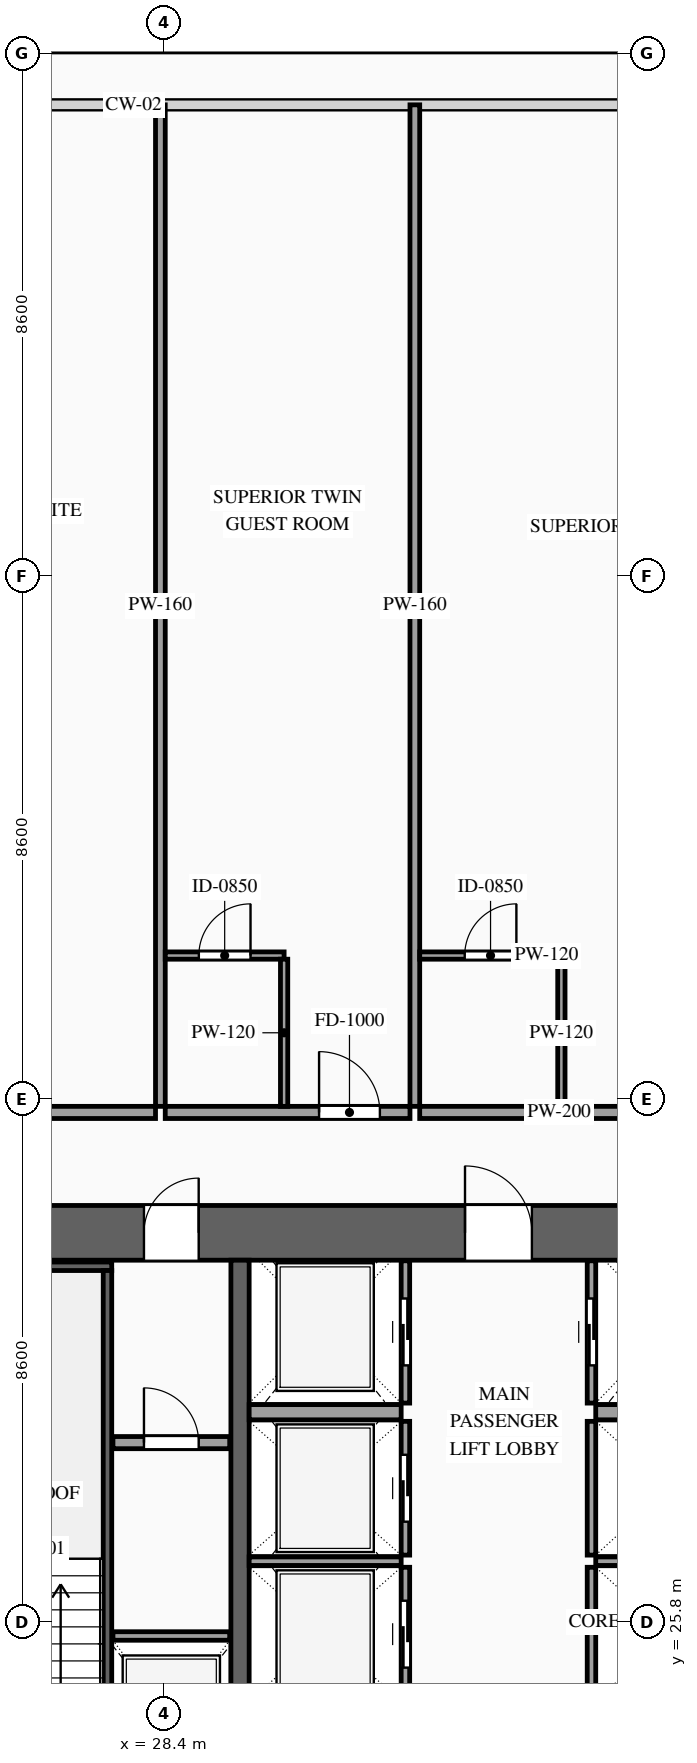
"""IFC4 building model, lengths in metres.
Left out: names, types, materials, properties, quantities, classifications, styles, units other than length and angle.
Written with IfcOpenShell. Run it as: python <this file> out.ifc"""

import sys

from ifc_helpers import new_model, si_unit, direction, frame, frame_2d, origin, place, context, subcontext, project, spatial, rectangle, extrude, source, transform, mapped, element, fill, save


model = new_model("IFC4")
c1 = context("Model", 3, precision=1e-05, world=origin(), true_north=direction((0.0, 1.0)))
c2 = subcontext(c1, "Body", "Model", "MODEL_VIEW")
j1 = project(units=[si_unit("LENGTHUNIT", "METRE"), si_unit("PLANEANGLEUNIT", "RADIAN")], contexts=[c1])
p1 = place(None, origin())
s1 = spatial("IfcSite", under=j1, at=p1, CompositionType="ELEMENT")
p2 = place(p1, origin())
s2 = spatial("IfcBuilding", under=s1, at=p2, CompositionType="ELEMENT")
p3 = place(p2, frame((0.0, 0.0, 49.6)))
s3 = spatial("IfcBuildingStorey", under=s2, at=p3, CompositionType="ELEMENT", Elevation=49.6)
p4 = place(p3, frame((23.35, 32.2, 0.0), z_axis=(0.0, 0.0, 1.0), x_axis=(1.0, 0.0, 0.0)))
e1 = element("IfcWall", 1, at=p4, inside=s3, PredefinedType="SHEAR", context=c2, shape_type="SweptSolid", body=[
    extrude(rectangle(XDim=27.3, YDim=0.9, at=frame_2d((13.65, 0.0))), origin(), (0.0, 0.0, 1.0), 3.6),
])
p5 = place(p4, frame((4.72, 0.0, 0.0)))
e2 = element("IfcOpeningElement", 2, at=p5, cuts=e1, PredefinedType="OPENING", context=c2, shape_type="SweptSolid", body=[
    extrude(rectangle(XDim=0.9, YDim=2.15, at=frame_2d((0.45, 1.075))), frame((0.0, 0.465, 0.0), z_axis=(0.0, -1.0, 0.0), x_axis=(1.0, 0.0, 0.0)), (0.0, 0.0, 1.0), 0.93),
])
p6 = place(p4, frame((10.0, 0.0, 0.0)))
e3 = element("IfcOpeningElement", 3, at=p6, cuts=e1, PredefinedType="OPENING", context=c2, shape_type="SweptSolid", body=[
    extrude(rectangle(XDim=1.1, YDim=2.2, at=frame_2d((0.55, 1.1))), frame((0.0, 0.465, 0.0), z_axis=(0.0, -1.0, 0.0), x_axis=(1.0, 0.0, 0.0)), (0.0, 0.0, 1.0), 0.93),
])
p7 = place(p4, frame((15.85, 0.0, 0.0)))
e4 = element("IfcOpeningElement", 4, at=p7, cuts=e1, PredefinedType="OPENING", context=c2, shape_type="SweptSolid", body=[
    extrude(rectangle(XDim=1.1, YDim=2.2, at=frame_2d((0.55, 1.1))), frame((0.0, 0.465, 0.0), z_axis=(0.0, -1.0, 0.0), x_axis=(1.0, 0.0, 0.0)), (0.0, 0.0, 1.0), 0.93),
])
p8 = place(p4, frame((19.05, 0.0, 0.0)))
e5 = element("IfcOpeningElement", 5, at=p8, cuts=e1, PredefinedType="OPENING", context=c2, shape_type="SweptSolid", body=[
    extrude(rectangle(XDim=0.9, YDim=2.15, at=frame_2d((0.45, 1.075))), frame((0.0, 0.465, 0.0), z_axis=(0.0, -1.0, 0.0), x_axis=(1.0, 0.0, 0.0)), (0.0, 0.0, 1.0), 0.93),
])
m1 = source(origin(), c2, "Body", "SweptSolid", [
    extrude(rectangle(XDim=11.9, YDim=0.3, at=frame_2d((5.95, 0.0))), origin(), (0.0, 0.0, 1.0), 3.6),
])
p9 = place(p3, frame((29.65, 19.85, 0.0), z_axis=(0.0, 0.0, 1.0), x_axis=(0.0, 1.0, 0.0)))
e6 = element("IfcWall", 6, at=p9, inside=s3, PredefinedType="SOLIDWALL", context=c2, shape_type="MappedRepresentation", body=[
    mapped(m1, transform((0.0, 0.0, 0.0), scale=1.0)),
])
m2 = source(origin(), c2, "Body", "SweptSolid", [
    extrude(rectangle(XDim=1.92, YDim=0.14, at=frame_2d((0.96, 0.0))), origin(), (0.0, 0.0, 1.0), 3.38),
])
p10 = place(p3, frame((27.56, 25.57, 0.0), z_axis=(0.0, 0.0, 1.0), x_axis=(1.0, 0.0, 0.0)))
e7 = element("IfcWall", 7, at=p10, inside=s3, PredefinedType="SOLIDWALL", context=c2, shape_type="MappedRepresentation", body=[
    mapped(m2, transform((0.0, 0.0, 0.0), scale=1.0)),
])
p11 = place(p3, frame((32.37, 24.5, 0.0), z_axis=(0.0, 0.0, 1.0), x_axis=(0.0, 1.0, 0.0)))
e8 = element("IfcWall", 8, at=p11, inside=s3, PredefinedType="SOLIDWALL", context=c2, shape_type="SweptSolid", body=[
    extrude(rectangle(XDim=2.2, YDim=0.14, at=frame_2d((1.1, 0.0))), origin(), (0.0, 0.0, 1.0), 3.38),
])
p12 = place(p11, frame((0.55, 0.0, 0.0)))
e9 = element("IfcOpeningElement", 9, at=p12, cuts=e8, PredefinedType="OPENING", context=c2, shape_type="SweptSolid", body=[
    extrude(rectangle(XDim=1.1, YDim=2.2, at=frame_2d((0.55, 1.1))), frame((0.0, 0.085, 0.0), z_axis=(0.0, -1.0, 0.0), x_axis=(1.0, 0.0, 0.0)), (0.0, 0.0, 1.0), 0.17),
])
m3 = source(origin(), c2, "Body", "SweptSolid", [
    extrude(rectangle(XDim=2.5, YDim=0.14, at=frame_2d((1.25, 0.0))), origin(), (0.0, 0.0, 1.0), 3.38),
])
p13 = place(p3, frame((29.8, 26.8, 0.0), z_axis=(0.0, 0.0, 1.0), x_axis=(1.0, 0.0, 0.0)))
e10 = element("IfcWall", 10, at=p13, inside=s3, PredefinedType="SOLIDWALL", context=c2, shape_type="MappedRepresentation", body=[
    mapped(m3, transform((0.0, 0.0, 0.0), scale=1.0)),
])
p14 = place(p3, frame((32.37, 26.9, 0.0), z_axis=(0.0, 0.0, 1.0), x_axis=(0.0, 1.0, 0.0)))
e11 = element("IfcWall", 11, at=p14, inside=s3, PredefinedType="SOLIDWALL", context=c2, shape_type="SweptSolid", body=[
    extrude(rectangle(XDim=2.2, YDim=0.14, at=frame_2d((1.1, 0.0))), origin(), (0.0, 0.0, 1.0), 3.38),
])
p15 = place(p14, frame((0.55, 0.0, 0.0)))
e12 = element("IfcOpeningElement", 12, at=p15, cuts=e11, PredefinedType="OPENING", context=c2, shape_type="SweptSolid", body=[
    extrude(rectangle(XDim=1.1, YDim=2.2, at=frame_2d((0.55, 1.1))), frame((0.0, 0.085, 0.0), z_axis=(0.0, -1.0, 0.0), x_axis=(1.0, 0.0, 0.0)), (0.0, 0.0, 1.0), 0.17),
])
p16 = place(p3, frame((32.37, 29.4, 0.0), z_axis=(0.0, 0.0, 1.0), x_axis=(0.0, 1.0, 0.0)))
e13 = element("IfcWall", 13, at=p16, inside=s3, PredefinedType="SOLIDWALL", context=c2, shape_type="SweptSolid", body=[
    extrude(rectangle(XDim=2.34, YDim=0.14, at=frame_2d((1.17, 0.0))), origin(), (0.0, 0.0, 1.0), 3.38),
])
p17 = place(p16, frame((0.62, 0.0, 0.0)))
e14 = element("IfcOpeningElement", 14, at=p17, cuts=e13, PredefinedType="OPENING", context=c2, shape_type="SweptSolid", body=[
    extrude(rectangle(XDim=1.1, YDim=2.2, at=frame_2d((0.55, 1.1))), frame((0.0, 0.085, 0.0), z_axis=(0.0, -1.0, 0.0), x_axis=(1.0, 0.0, 0.0)), (0.0, 0.0, 1.0), 0.17),
])
m4 = source(origin(), c2, "Body", "SweptSolid", [
    extrude(rectangle(XDim=2.5, YDim=0.25, at=frame_2d((1.25, 0.0))), origin(), (0.0, 0.0, 1.0), 3.38),
])
p18 = place(p3, frame((29.8, 29.25, 0.0), z_axis=(0.0, 0.0, 1.0), x_axis=(1.0, 0.0, 0.0)))
e15 = element("IfcWall", 15, at=p18, inside=s3, PredefinedType="SOLIDWALL", context=c2, shape_type="MappedRepresentation", body=[
    mapped(m4, transform((0.0, 0.0, 0.0), scale=1.0)),
])
m5 = source(origin(), c2, "Body", "SweptSolid", [
    extrude(rectangle(XDim=2.2, YDim=0.14, at=frame_2d((1.1, 0.0))), origin(), (0.0, 0.0, 1.0), 3.38),
])
p19 = place(p3, frame((35.43, 24.5, 0.0), z_axis=(0.0, 0.0, 1.0), x_axis=(0.0, 1.0, 0.0)))
e16 = element("IfcWall", 16, at=p19, inside=s3, PredefinedType="SOLIDWALL", context=c2, shape_type="MappedRepresentation", body=[
    mapped(m5, transform((0.0, 0.0, 0.0), scale=1.0)),
])
m6 = source(origin(), c2, "Body", "SweptSolid", [
    extrude(rectangle(XDim=2.4, YDim=0.14, at=frame_2d((1.2, 0.0))), origin(), (0.0, 0.0, 1.0), 3.38),
])
p20 = place(p3, frame((35.5, 26.8, 0.0), z_axis=(0.0, 0.0, 1.0), x_axis=(1.0, 0.0, 0.0)))
e17 = element("IfcWall", 17, at=p20, inside=s3, PredefinedType="SOLIDWALL", context=c2, shape_type="MappedRepresentation", body=[
    mapped(m6, transform((0.0, 0.0, 0.0), scale=1.0)),
])
m7 = source(origin(), c2, "Body", "SweptSolid", [
    extrude(rectangle(XDim=2.2, YDim=0.14, at=frame_2d((1.1, 0.0))), origin(), (0.0, 0.0, 1.0), 3.38),
])
p21 = place(p3, frame((35.43, 26.9, 0.0), z_axis=(0.0, 0.0, 1.0), x_axis=(0.0, 1.0, 0.0)))
e18 = element("IfcWall", 18, at=p21, inside=s3, PredefinedType="SOLIDWALL", context=c2, shape_type="MappedRepresentation", body=[
    mapped(m7, transform((0.0, 0.0, 0.0), scale=1.0)),
])
p22 = place(p3, frame((35.43, 29.4, 0.0), z_axis=(0.0, 0.0, 1.0), x_axis=(0.0, 1.0, 0.0)))
e19 = element("IfcWall", 19, at=p22, inside=s3, PredefinedType="SOLIDWALL", context=c2, shape_type="SweptSolid", body=[
    extrude(rectangle(XDim=2.34, YDim=0.14, at=frame_2d((1.17, 0.0))), origin(), (0.0, 0.0, 1.0), 3.38),
])
p23 = place(p22, frame((0.62, 0.0, 0.0)))
e20 = element("IfcOpeningElement", 20, at=p23, cuts=e19, PredefinedType="OPENING", context=c2, shape_type="SweptSolid", body=[
    extrude(rectangle(XDim=1.1, YDim=2.2, at=frame_2d((0.55, 1.1))), frame((0.0, 0.085, 0.0), z_axis=(0.0, -1.0, 0.0), x_axis=(1.0, 0.0, 0.0)), (0.0, 0.0, 1.0), 0.17),
])
m8 = source(origin(), c2, "Body", "SweptSolid", [
    extrude(rectangle(XDim=2.4, YDim=0.25, at=frame_2d((1.2, 0.0))), origin(), (0.0, 0.0, 1.0), 3.38),
])
p24 = place(p3, frame((35.5, 29.25, 0.0), z_axis=(0.0, 0.0, 1.0), x_axis=(1.0, 0.0, 0.0)))
e21 = element("IfcWall", 21, at=p24, inside=s3, PredefinedType="SOLIDWALL", context=c2, shape_type="MappedRepresentation", body=[
    mapped(m8, transform((0.0, 0.0, 0.0), scale=1.0)),
])
m9 = source(origin(), c2, "Body", "SweptSolid", [
    extrude(rectangle(XDim=3.28, YDim=0.14, at=frame_2d((1.64, 0.0))), origin(), (0.0, 0.0, 1.0), 3.38),
])
p25 = place(p3, frame((24.26, 31.65, 0.0), z_axis=(0.0, 0.0, 1.0), x_axis=(1.0, 0.0, 0.0)))
e22 = element("IfcWall", 22, at=p25, inside=s3, PredefinedType="SOLIDWALL", context=c2, shape_type="MappedRepresentation", body=[
    mapped(m9, transform((0.0, 0.0, 0.0), scale=1.0)),
])
m10 = source(origin(), c2, "Body", "SweptSolid", [
    extrude(rectangle(XDim=8.94, YDim=0.14, at=frame_2d((4.47, 0.0))), origin(), (0.0, 0.0, 1.0), 3.38),
])
p26 = place(p3, frame((27.47, 22.64, 0.0), z_axis=(0.0, 0.0, 1.0), x_axis=(0.0, 1.0, 0.0)))
e23 = element("IfcWall", 23, at=p26, inside=s3, PredefinedType="SOLIDWALL", context=c2, shape_type="MappedRepresentation", body=[
    mapped(m10, transform((0.0, 0.0, 0.0), scale=1.0)),
])
p27 = place(p3, frame((27.56, 28.75, 0.0), z_axis=(0.0, 0.0, 1.0), x_axis=(1.0, 0.0, 0.0)))
e24 = element("IfcWall", 24, at=p27, inside=s3, PredefinedType="PARTITIONING", context=c2, shape_type="SweptSolid", body=[
    extrude(rectangle(XDim=1.92, YDim=0.2, at=frame_2d((0.96, 0.0))), origin(), (0.0, 0.0, 1.0), 3.38),
])
p28 = place(p27, frame((0.51, 0.0, 0.0)))
e25 = element("IfcOpeningElement", 25, at=p28, cuts=e24, PredefinedType="OPENING", context=c2, shape_type="SweptSolid", body=[
    extrude(rectangle(XDim=0.9, YDim=2.15, at=frame_2d((0.45, 1.075))), frame((0.0, 0.115, 0.0), z_axis=(0.0, -1.0, 0.0), x_axis=(1.0, 0.0, 0.0)), (0.0, 0.0, 1.0), 0.23),
])
p29 = place(p3, frame((21.197, 34.18, 0.0), z_axis=(0.0, 0.0, 1.0), x_axis=(1.0, 0.0, 0.0)))
e26 = element("IfcWall", 26, at=p29, inside=s3, PredefinedType="PARTITIONING", context=c2, shape_type="SweptSolid", body=[
    extrude(rectangle(XDim=7.063, YDim=0.2, at=frame_2d((3.531, 0.0))), origin(), (0.0, 0.0, 1.0), 3.38),
])
p30 = place(p29, frame((4.237, 0.0, 0.0)))
e27 = element("IfcOpeningElement", 27, at=p30, cuts=e26, PredefinedType="OPENING", context=c2, shape_type="SweptSolid", body=[
    extrude(rectangle(XDim=1.0, YDim=2.2, at=frame_2d((0.5, 1.1))), frame((0.0, 0.115, 0.0), z_axis=(0.0, -1.0, 0.0), x_axis=(1.0, 0.0, 0.0)), (0.0, 0.0, 1.0), 0.23),
])
m11 = source(origin(), c2, "Body", "SweptSolid", [
    extrude(rectangle(XDim=16.47, YDim=0.16, at=frame_2d((8.235, 0.0))), origin(), (0.0, 0.0, 1.0), 3.38),
])
p31 = place(p3, frame((28.34, 34.28, 0.0), z_axis=(0.0, 0.0, 1.0), x_axis=(0.0, 1.0, 0.0)))
e28 = element("IfcWall", 28, at=p31, inside=s3, PredefinedType="PARTITIONING", context=c2, shape_type="MappedRepresentation", body=[
    mapped(m11, transform((0.0, 0.0, 0.0), scale=1.0)),
])
p32 = place(p3, frame((28.42, 34.18, 0.0), z_axis=(0.0, 0.0, 1.0), x_axis=(1.0, 0.0, 0.0)))
e29 = element("IfcWall", 29, at=p32, inside=s3, PredefinedType="PARTITIONING", context=c2, shape_type="SweptSolid", body=[
    extrude(rectangle(XDim=4.025, YDim=0.2, at=frame_2d((2.013, 0.0))), origin(), (0.0, 0.0, 1.0), 3.38),
])
p33 = place(p32, frame((2.53, 0.0, 0.0)))
e30 = element("IfcOpeningElement", 30, at=p33, cuts=e29, PredefinedType="OPENING", context=c2, shape_type="SweptSolid", body=[
    extrude(rectangle(XDim=1.0, YDim=2.2, at=frame_2d((0.5, 1.1))), frame((0.0, 0.115, 0.0), z_axis=(0.0, -1.0, 0.0), x_axis=(1.0, 0.0, 0.0)), (0.0, 0.0, 1.0), 0.23),
])
p34 = place(p3, frame((32.525, 34.28, 0.0), z_axis=(0.0, 0.0, 1.0), x_axis=(0.0, 1.0, 0.0)))
e31 = element("IfcWall", 31, at=p34, inside=s3, PredefinedType="PARTITIONING", context=c2, shape_type="MappedRepresentation", body=[
    mapped(m11, transform((0.0, 0.0, 0.0), scale=1.0)),
])
p35 = place(p3, frame((28.42, 36.76, 0.0), z_axis=(0.0, 0.0, 1.0), x_axis=(1.0, 0.0, 0.0)))
e32 = element("IfcWall", 32, at=p35, inside=s3, PredefinedType="PARTITIONING", context=c2, shape_type="SweptSolid", body=[
    extrude(rectangle(XDim=1.955, YDim=0.12, at=frame_2d((0.978, 0.0))), origin(), (0.0, 0.0, 1.0), 3.38),
])
p36 = place(p35, frame((0.552, 0.0, 0.0)))
e33 = element("IfcOpeningElement", 33, at=p36, cuts=e32, PredefinedType="OPENING", context=c2, shape_type="SweptSolid", body=[
    extrude(rectangle(XDim=0.85, YDim=2.1, at=frame_2d((0.425, 1.05))), frame((0.0, 0.075, 0.0), z_axis=(0.0, -1.0, 0.0), x_axis=(1.0, 0.0, 0.0)), (0.0, 0.0, 1.0), 0.15),
])
m12 = source(origin(), c2, "Body", "SweptSolid", [
    extrude(rectangle(XDim=2.42, YDim=0.12, at=frame_2d((1.21, 0.0))), origin(), (0.0, 0.0, 1.0), 3.38),
])
p37 = place(p3, frame((30.375, 34.28, 0.0), z_axis=(0.0, 0.0, 1.0), x_axis=(0.0, 1.0, 0.0)))
e34 = element("IfcWall", 34, at=p37, inside=s3, PredefinedType="PARTITIONING", context=c2, shape_type="MappedRepresentation", body=[
    mapped(m12, transform((0.0, 0.0, 0.0), scale=1.0)),
])
p38 = place(p3, frame((32.605, 34.18, 0.0), z_axis=(0.0, 0.0, 1.0), x_axis=(1.0, 0.0, 0.0)))
e35 = element("IfcWall", 35, at=p38, inside=s3, PredefinedType="PARTITIONING", context=c2, shape_type="SweptSolid", body=[
    extrude(rectangle(XDim=8.261, YDim=0.2, at=frame_2d((4.13, 0.0))), origin(), (0.0, 0.0, 1.0), 3.38),
])
p39 = place(p38, frame((4.836, 0.0, 0.0)))
e36 = element("IfcOpeningElement", 36, at=p39, cuts=e35, PredefinedType="OPENING", context=c2, shape_type="SweptSolid", body=[
    extrude(rectangle(XDim=1.0, YDim=2.2, at=frame_2d((0.5, 1.1))), frame((0.0, 0.115, 0.0), z_axis=(0.0, -1.0, 0.0), x_axis=(1.0, 0.0, 0.0)), (0.0, 0.0, 1.0), 0.23),
])
p40 = place(p3, frame((32.605, 36.76, 0.0), z_axis=(0.0, 0.0, 1.0), x_axis=(1.0, 0.0, 0.0)))
e37 = element("IfcWall", 37, at=p40, inside=s3, PredefinedType="PARTITIONING", context=c2, shape_type="SweptSolid", body=[
    extrude(rectangle(XDim=2.33, YDim=0.12, at=frame_2d((1.165, 0.0))), origin(), (0.0, 0.0, 1.0), 3.38),
])
p41 = place(p40, frame((0.74, 0.0, 0.0)))
e38 = element("IfcOpeningElement", 38, at=p41, cuts=e37, PredefinedType="OPENING", context=c2, shape_type="SweptSolid", body=[
    extrude(rectangle(XDim=0.85, YDim=2.1, at=frame_2d((0.425, 1.05))), frame((0.0, 0.075, 0.0), z_axis=(0.0, -1.0, 0.0), x_axis=(1.0, 0.0, 0.0)), (0.0, 0.0, 1.0), 0.15),
])
p42 = place(p3, frame((34.935, 34.28, 0.0), z_axis=(0.0, 0.0, 1.0), x_axis=(0.0, 1.0, 0.0)))
e39 = element("IfcWall", 39, at=p42, inside=s3, PredefinedType="PARTITIONING", context=c2, shape_type="MappedRepresentation", body=[
    mapped(m12, transform((0.0, 0.0, 0.0), scale=1.0)),
])
m13 = source(origin(), c2, "Body", "SweptSolid", [
    extrude(rectangle(XDim=1.1, YDim=2.2, at=frame_2d((0.55, 1.1))), frame((0.0, 0.025, 0.0), z_axis=(0.0, -1.0, 0.0), x_axis=(1.0, 0.0, 0.0)), (0.0, 0.0, 1.0), 0.05),
])
p43 = place(p12, origin())
e40 = element("IfcDoor", 40, at=p43, inside=s3, OperationType="SLIDING_TO_LEFT", PredefinedType="DOOR", context=c2, shape_type="MappedRepresentation", body=[
    mapped(m13, transform((0.0, 0.0, 0.0), scale=1.0)),
])
fill(e9, e40)
p44 = place(p15, origin())
e41 = element("IfcDoor", 41, at=p44, inside=s3, OperationType="SLIDING_TO_RIGHT", PredefinedType="DOOR", context=c2, shape_type="MappedRepresentation", body=[
    mapped(m13, transform((0.0, 0.0, 0.0), scale=1.0)),
])
fill(e12, e41)
p45 = place(p17, origin())
e42 = element("IfcDoor", 42, at=p45, inside=s3, OperationType="SLIDING_TO_LEFT", PredefinedType="DOOR", context=c2, shape_type="MappedRepresentation", body=[
    mapped(m13, transform((0.0, 0.0, 0.0), scale=1.0)),
])
fill(e14, e42)
p46 = place(p23, origin())
e43 = element("IfcDoor", 43, at=p46, inside=s3, OperationType="SLIDING_TO_RIGHT", PredefinedType="DOOR", context=c2, shape_type="MappedRepresentation", body=[
    mapped(m13, transform((0.0, 0.0, 0.0), scale=1.0)),
])
fill(e20, e43)
m14 = source(origin(), c2, "Body", "SweptSolid", [
    extrude(rectangle(XDim=0.9, YDim=2.15, at=frame_2d((0.45, 1.075))), frame((0.0, 0.025, 0.0), z_axis=(0.0, -1.0, 0.0), x_axis=(1.0, 0.0, 0.0)), (0.0, 0.0, 1.0), 0.05),
])
p47 = place(p5, origin())
e44 = element("IfcDoor", 44, at=p47, inside=s3, OperationType="SINGLE_SWING_RIGHT", PredefinedType="DOOR", context=c2, shape_type="MappedRepresentation", body=[
    mapped(m14, transform((0.0, 0.0, 0.0), scale=1.0)),
])
fill(e2, e44)
m15 = source(origin(), c2, "Body", "SweptSolid", [
    extrude(rectangle(XDim=1.1, YDim=2.2, at=frame_2d((0.55, 1.1))), frame((0.0, 0.025, 0.0), z_axis=(0.0, -1.0, 0.0), x_axis=(1.0, 0.0, 0.0)), (0.0, 0.0, 1.0), 0.05),
])
p48 = place(p6, origin())
e45 = element("IfcDoor", 45, at=p48, inside=s3, OperationType="SINGLE_SWING_LEFT", PredefinedType="DOOR", context=c2, shape_type="MappedRepresentation", body=[
    mapped(m15, transform((0.0, 0.0, 0.0), scale=1.0)),
])
fill(e3, e45)
p49 = place(p28, origin())
e46 = element("IfcDoor", 46, at=p49, inside=s3, OperationType="SINGLE_SWING_LEFT", PredefinedType="DOOR", context=c2, shape_type="MappedRepresentation", body=[
    mapped(m14, transform((0.0, 0.0, 0.0), scale=1.0)),
])
fill(e25, e46)
m16 = source(origin(), c2, "Body", "SweptSolid", [
    extrude(rectangle(XDim=1.0, YDim=2.2, at=frame_2d((0.5, 1.1))), frame((0.0, 0.025, 0.0), z_axis=(0.0, -1.0, 0.0), x_axis=(1.0, 0.0, 0.0)), (0.0, 0.0, 1.0), 0.05),
])
p50 = place(p33, origin())
e47 = element("IfcDoor", 47, at=p50, inside=s3, OperationType="SINGLE_SWING_LEFT", PredefinedType="DOOR", context=c2, shape_type="MappedRepresentation", body=[
    mapped(m16, transform((0.0, 0.0, 0.0), scale=1.0)),
])
fill(e30, e47)
m17 = source(origin(), c2, "Body", "SweptSolid", [
    extrude(rectangle(XDim=0.85, YDim=2.1, at=frame_2d((0.425, 1.05))), frame((0.0, 0.025, 0.0), z_axis=(0.0, -1.0, 0.0), x_axis=(1.0, 0.0, 0.0)), (0.0, 0.0, 1.0), 0.05),
])
p51 = place(p36, origin())
e48 = element("IfcDoor", 48, at=p51, inside=s3, OperationType="SINGLE_SWING_RIGHT", PredefinedType="DOOR", context=c2, shape_type="MappedRepresentation", body=[
    mapped(m17, transform((0.0, 0.0, 0.0), scale=1.0)),
])
fill(e33, e48)
p52 = place(p41, origin())
e49 = element("IfcDoor", 49, at=p52, inside=s3, OperationType="SINGLE_SWING_RIGHT", PredefinedType="DOOR", context=c2, shape_type="MappedRepresentation", body=[
    mapped(m17, transform((0.0, 0.0, 0.0), scale=1.0)),
])
fill(e38, e49)
save(model, sys.argv[1])
